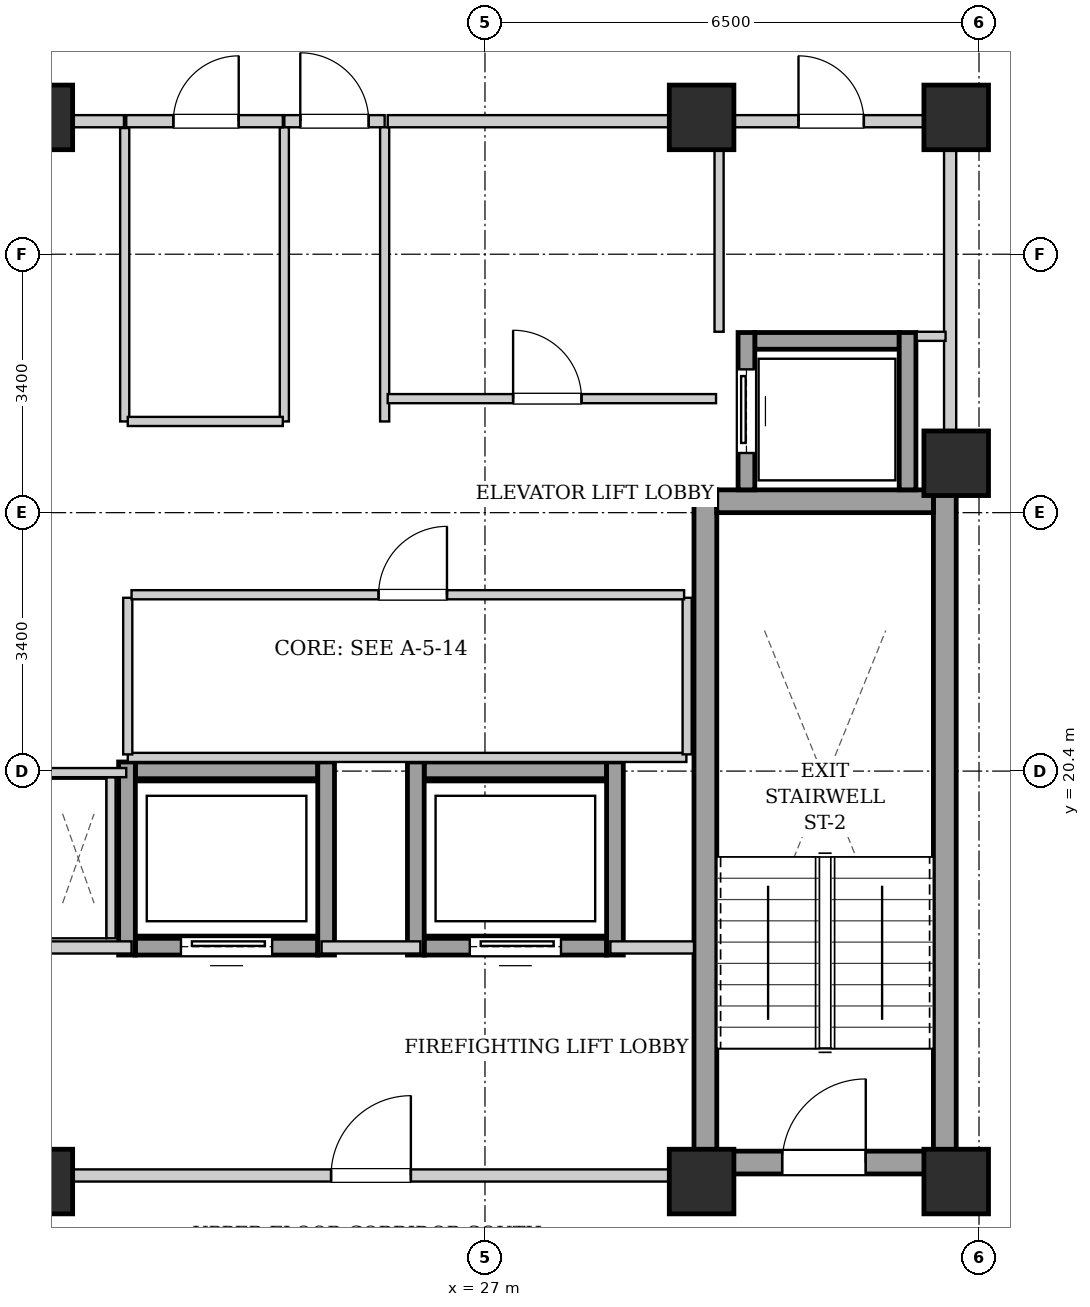
"""IFC4 building model, lengths in metres.
Left out: names, types, materials, properties, quantities, classifications, styles, units other than length and angle.
Written with IfcOpenShell. Run it as: python <this file> out.ifc"""

import sys

from ifc_helpers import new_model, si_unit, direction, frame, frame_2d, origin, origin_2d, place, context, subcontext, project, spatial, rectangle, extrude, element, fill, save


model = new_model("IFC4")
c1 = context("Model", 3, precision=1e-05, world=origin(), true_north=direction((0.0, 1.0)))
c2 = subcontext(c1, "Body", "Model", "MODEL_VIEW")
j1 = project(units=[si_unit("LENGTHUNIT", "METRE"), si_unit("PLANEANGLEUNIT", "RADIAN")], contexts=[c1])
p1 = place(None, origin())
s1 = spatial("IfcSite", under=j1, at=p1, CompositionType="ELEMENT")
p2 = place(p1, origin())
s2 = spatial("IfcBuilding", under=s1, at=p2, CompositionType="ELEMENT")
p3 = place(p2, frame((0.0, 0.0, 184.3)))
s3 = spatial("IfcBuildingStorey", under=s2, at=p3, CompositionType="ELEMENT", Elevation=184.3)
for number, where, z_axis, x_axis in (
    (1, (21.15, 15.0, 0.0), (0.0, 0.0, 1.0), (1.0, 0.0, 0.0)),
    (2, (29.85, 15.0, 0.0), (0.0, 0.0, 1.0), (1.0, 0.0, 0.0)),
    (3, (33.2, 15.0, 0.0), (0.0, 0.0, 1.0), (1.0, 0.0, 0.0)),
    (4, (21.15, 29.0, 0.0), (0.0, 0.0, 1.0), (1.0, 0.0, 0.0)),
    (5, (29.85, 29.0, 0.0), (0.0, 0.0, 1.0), (1.0, 0.0, 0.0)),
    (6, (33.2, 29.0, 0.0), (0.0, 0.0, 1.0), (1.0, 0.0, 0.0)),
    (7, (33.2, 24.45, 0.0), (0.0, 0.0, 1.0), (1.0, 0.0, 0.0)),
):
    element("IfcColumn", number, at=place(p3, frame(where, z_axis=z_axis, x_axis=x_axis)), inside=s3, PredefinedType="COLUMN", context=c2, shape_type="SweptSolid", body=[
        extrude(rectangle(XDim=0.85, YDim=0.85, at=origin_2d()), origin(), (0.0, 0.0, 1.0), 3.3),
    ])
for number, where, z_axis, x_axis in (
    (8, (29.9, 15.1, 0.0), (0.0, 0.0, 1.0), (0.0, 1.0, 0.0)),
    (9, (33.05, 15.1, 0.0), (0.0, 0.0, 1.0), (0.0, 1.0, 0.0)),
):
    element("IfcWall", number, at=place(p3, frame(where, z_axis=z_axis, x_axis=x_axis)), inside=s3, PredefinedType="SHEAR", context=c2, shape_type="SweptSolid", body=[
        extrude(rectangle(XDim=9.0, YDim=0.3, at=frame_2d((4.5, 0.0))), origin(), (0.0, 0.0, 1.0), 3.04),
    ])
p4 = place(p3, frame((30.05, 23.95, 0.0), z_axis=(0.0, 0.0, 1.0), x_axis=(1.0, 0.0, 0.0)))
e10 = element("IfcWall", 10, at=p4, inside=s3, PredefinedType="SHEAR", context=c2, shape_type="SweptSolid", body=[
    extrude(rectangle(XDim=2.85, YDim=0.3, at=frame_2d((1.425, 0.0))), origin(), (0.0, 0.0, 1.0), 3.04),
])
p5 = place(p3, frame((30.05, 15.25, 0.0), z_axis=(0.0, 0.0, 1.0), x_axis=(1.0, 0.0, 0.0)))
e11 = element("IfcWall", 11, at=p5, inside=s3, PredefinedType="SHEAR", context=c2, shape_type="SweptSolid", body=[
    extrude(rectangle(XDim=2.85, YDim=0.3, at=frame_2d((1.425, 0.0))), origin(), (0.0, 0.0, 1.0), 3.04),
])
p6 = place(p5, frame((0.86, 0.0, 0.0)))
e12 = element("IfcOpeningElement", 12, at=p6, cuts=e11, PredefinedType="OPENING", context=c2, shape_type="SweptSolid", body=[
    extrude(rectangle(XDim=1.1, YDim=2.05, at=frame_2d((0.55, 1.025))), frame((0.0, 0.16, 0.0), z_axis=(0.0, -1.0, 0.0), x_axis=(1.0, 0.0, 0.0)), (0.0, 0.0, 1.0), 0.32),
])
p7 = place(p3, frame((30.55, 26.06, 0.0), z_axis=(0.0, 0.0, 1.0), x_axis=(1.0, 0.0, 0.0)))
e13 = element("IfcWall", 13, at=p7, inside=s3, PredefinedType="SHEAR", context=c2, shape_type="SweptSolid", body=[
    extrude(rectangle(XDim=1.9, YDim=0.22, at=frame_2d((0.95, 0.0))), origin(), (0.0, 0.0, 1.0), 3.04),
])
p8 = place(p3, frame((30.44, 24.1, 0.0), z_axis=(0.0, 0.0, 1.0), x_axis=(0.0, 1.0, 0.0)))
e14 = element("IfcWall", 14, at=p8, inside=s3, PredefinedType="SHEAR", context=c2, shape_type="SweptSolid", body=[
    extrude(rectangle(XDim=2.07, YDim=0.22, at=frame_2d((1.035, 0.0))), origin(), (0.0, 0.0, 1.0), 3.04),
])
p9 = place(p8, frame((0.485, 0.0, 0.0)))
e15 = element("IfcOpeningElement", 15, at=p9, cuts=e14, PredefinedType="OPENING", context=c2, shape_type="SweptSolid", body=[
    extrude(rectangle(XDim=1.1, YDim=2.15, at=frame_2d((0.55, 1.075))), frame((0.0, 0.12, 0.0), z_axis=(0.0, -1.0, 0.0), x_axis=(1.0, 0.0, 0.0)), (0.0, 0.0, 1.0), 0.24),
])
p10 = place(p3, frame((32.56, 24.1, 0.0), z_axis=(0.0, 0.0, 1.0), x_axis=(0.0, 1.0, 0.0)))
e16 = element("IfcWall", 16, at=p10, inside=s3, PredefinedType="SHEAR", context=c2, shape_type="SweptSolid", body=[
    extrude(rectangle(XDim=2.07, YDim=0.22, at=frame_2d((1.035, 0.0))), origin(), (0.0, 0.0, 1.0), 3.04),
])
p11 = place(p3, frame((22.4, 18.09, 0.0), z_axis=(0.0, 0.0, 1.0), x_axis=(1.0, 0.0, 0.0)))
e17 = element("IfcWall", 17, at=p11, inside=s3, PredefinedType="SHEAR", context=c2, shape_type="SweptSolid", body=[
    extrude(rectangle(XDim=2.4, YDim=0.22, at=frame_2d((1.2, 0.0))), origin(), (0.0, 0.0, 1.0), 3.04),
])
p12 = place(p11, frame((0.6, 0.0, 0.0)))
e18 = element("IfcOpeningElement", 18, at=p12, cuts=e17, PredefinedType="OPENING", context=c2, shape_type="SweptSolid", body=[
    extrude(rectangle(XDim=1.2, YDim=2.15, at=frame_2d((0.6, 1.075))), frame((0.0, 0.12, 0.0), z_axis=(0.0, -1.0, 0.0), x_axis=(1.0, 0.0, 0.0)), (0.0, 0.0, 1.0), 0.24),
])
p13 = place(p3, frame((22.4, 20.41, 0.0), z_axis=(0.0, 0.0, 1.0), x_axis=(1.0, 0.0, 0.0)))
e19 = element("IfcWall", 19, at=p13, inside=s3, PredefinedType="SHEAR", context=c2, shape_type="SweptSolid", body=[
    extrude(rectangle(XDim=2.4, YDim=0.22, at=frame_2d((1.2, 0.0))), origin(), (0.0, 0.0, 1.0), 3.04),
])
for number, where, z_axis, x_axis in (
    (20, (22.29, 17.98, 0.0), (0.0, 0.0, 1.0), (0.0, 1.0, 0.0)),
    (21, (24.91, 17.98, 0.0), (0.0, 0.0, 1.0), (0.0, 1.0, 0.0)),
):
    element("IfcWall", number, at=place(p3, frame(where, z_axis=z_axis, x_axis=x_axis)), inside=s3, PredefinedType="SHEAR", context=c2, shape_type="SweptSolid", body=[
        extrude(rectangle(XDim=2.54, YDim=0.22, at=frame_2d((1.27, 0.0))), origin(), (0.0, 0.0, 1.0), 3.04),
    ])
p14 = place(p3, frame((26.2, 18.09, 0.0), z_axis=(0.0, 0.0, 1.0), x_axis=(1.0, 0.0, 0.0)))
e22 = element("IfcWall", 22, at=p14, inside=s3, PredefinedType="SHEAR", context=c2, shape_type="SweptSolid", body=[
    extrude(rectangle(XDim=2.4, YDim=0.22, at=frame_2d((1.2, 0.0))), origin(), (0.0, 0.0, 1.0), 3.04),
])
p15 = place(p14, frame((0.6, 0.0, 0.0)))
e23 = element("IfcOpeningElement", 23, at=p15, cuts=e22, PredefinedType="OPENING", context=c2, shape_type="SweptSolid", body=[
    extrude(rectangle(XDim=1.2, YDim=2.15, at=frame_2d((0.6, 1.075))), frame((0.0, 0.12, 0.0), z_axis=(0.0, -1.0, 0.0), x_axis=(1.0, 0.0, 0.0)), (0.0, 0.0, 1.0), 0.24),
])
p16 = place(p3, frame((26.2, 20.41, 0.0), z_axis=(0.0, 0.0, 1.0), x_axis=(1.0, 0.0, 0.0)))
e24 = element("IfcWall", 24, at=p16, inside=s3, PredefinedType="SHEAR", context=c2, shape_type="SweptSolid", body=[
    extrude(rectangle(XDim=2.4, YDim=0.22, at=frame_2d((1.2, 0.0))), origin(), (0.0, 0.0, 1.0), 3.04),
])
for number, where, z_axis, x_axis in (
    (25, (26.09, 17.98, 0.0), (0.0, 0.0, 1.0), (0.0, 1.0, 0.0)),
    (26, (28.71, 17.98, 0.0), (0.0, 0.0, 1.0), (0.0, 1.0, 0.0)),
):
    element("IfcWall", number, at=place(p3, frame(where, z_axis=z_axis, x_axis=x_axis)), inside=s3, PredefinedType="SHEAR", context=c2, shape_type="SweptSolid", body=[
        extrude(rectangle(XDim=2.54, YDim=0.22, at=frame_2d((1.27, 0.0))), origin(), (0.0, 0.0, 1.0), 3.04),
    ])
p17 = place(p3, frame((21.25, 15.08, 0.0), z_axis=(0.0, 0.0, 1.0), x_axis=(1.0, 0.0, 0.0)))
e27 = element("IfcWall", 27, at=p17, inside=s3, PredefinedType="PARTITIONING", context=c2, shape_type="SweptSolid", body=[
    extrude(rectangle(XDim=8.5, YDim=0.16, at=frame_2d((4.25, 0.0))), origin(), (0.0, 0.0, 1.0), 2.556),
])
p18 = place(p17, frame((3.725, 0.0, 0.0)))
e28 = element("IfcOpeningElement", 28, at=p18, cuts=e27, PredefinedType="OPENING", context=c2, shape_type="SweptSolid", body=[
    extrude(rectangle(XDim=1.05, YDim=2.05, at=frame_2d((0.525, 1.025))), frame((0.0, 0.09, 0.0), z_axis=(0.0, -1.0, 0.0), x_axis=(1.0, 0.0, 0.0)), (0.0, 0.0, 1.0), 0.18),
])
p19 = place(p3, frame((21.25, 18.08, 0.0), z_axis=(0.0, 0.0, 1.0), x_axis=(1.0, 0.0, 0.0)))
e29 = element("IfcWall", 29, at=p19, inside=s3, PredefinedType="PARTITIONING", context=c2, shape_type="SweptSolid", body=[
    extrude(rectangle(XDim=1.1, YDim=0.16, at=frame_2d((0.55, 0.0))), origin(), (0.0, 0.0, 1.0), 3.04),
])
p20 = place(p3, frame((24.85, 18.08, 0.0), z_axis=(0.0, 0.0, 1.0), x_axis=(1.0, 0.0, 0.0)))
e30 = element("IfcWall", 30, at=p20, inside=s3, PredefinedType="PARTITIONING", context=c2, shape_type="SweptSolid", body=[
    extrude(rectangle(XDim=1.3, YDim=0.16, at=frame_2d((0.65, 0.0))), origin(), (0.0, 0.0, 1.0), 3.04),
])
p21 = place(p3, frame((28.65, 18.08, 0.0), z_axis=(0.0, 0.0, 1.0), x_axis=(1.0, 0.0, 0.0)))
e31 = element("IfcWall", 31, at=p21, inside=s3, PredefinedType="PARTITIONING", context=c2, shape_type="SweptSolid", body=[
    extrude(rectangle(XDim=1.1, YDim=0.16, at=frame_2d((0.55, 0.0))), origin(), (0.0, 0.0, 1.0), 3.04),
])
p22 = place(p3, frame((33.12, 24.12, 0.0), z_axis=(0.0, 0.0, 1.0), x_axis=(0.0, 1.0, 0.0)))
e32 = element("IfcWall", 32, at=p22, inside=s3, PredefinedType="PARTITIONING", context=c2, shape_type="SweptSolid", body=[
    extrude(rectangle(XDim=4.76, YDim=0.16, at=frame_2d((2.38, 0.0))), origin(), (0.0, 0.0, 1.0), 3.04),
])
p23 = place(p3, frame((24.36, 28.95, 0.0), z_axis=(0.0, 0.0, 1.0), x_axis=(1.0, 0.0, 0.0)))
e33 = element("IfcWall", 33, at=p23, inside=s3, PredefinedType="PARTITIONING", context=c2, shape_type="SweptSolid", body=[
    extrude(rectangle(XDim=1.32, YDim=0.16, at=frame_2d((0.66, 0.0))), origin(), (0.0, 0.0, 1.0), 2.556),
])
p24 = place(p23, frame((0.21, 0.0, 0.0)))
e34 = element("IfcOpeningElement", 34, at=p24, cuts=e33, PredefinedType="OPENING", context=c2, shape_type="SweptSolid", body=[
    extrude(rectangle(XDim=0.9, YDim=2.05, at=frame_2d((0.45, 1.025))), frame((0.0, 0.09, 0.0), z_axis=(0.0, -1.0, 0.0), x_axis=(1.0, 0.0, 0.0)), (0.0, 0.0, 1.0), 0.18),
])
p25 = place(p3, frame((17.96, 28.95, 0.0), z_axis=(0.0, 0.0, 1.0), x_axis=(1.0, 0.0, 0.0)))
e35 = element("IfcWall", 35, at=p25, inside=s3, PredefinedType="PARTITIONING", context=c2, shape_type="SweptSolid", body=[
    extrude(rectangle(XDim=4.29, YDim=0.16, at=frame_2d((2.145, 0.0))), origin(), (0.0, 0.0, 1.0), 2.556),
])
p26 = place(p25, frame((1.715, 0.0, 0.0)))
e36 = element("IfcOpeningElement", 36, at=p26, cuts=e35, PredefinedType="OPENING", context=c2, shape_type="SweptSolid", body=[
    extrude(rectangle(XDim=0.86, YDim=2.05, at=frame_2d((0.43, 1.025))), frame((0.0, 0.09, 0.0), z_axis=(0.0, -1.0, 0.0), x_axis=(1.0, 0.0, 0.0)), (0.0, 0.0, 1.0), 0.18),
])
p27 = place(p3, frame((22.08, 18.2, 0.0), z_axis=(0.0, 0.0, 1.0), x_axis=(0.0, 1.0, 0.0)))
e37 = element("IfcWall", 37, at=p27, inside=s3, PredefinedType="PARTITIONING", context=c2, shape_type="SweptSolid", body=[
    extrude(rectangle(XDim=2.12, YDim=0.12, at=frame_2d((1.06, 0.0))), origin(), (0.0, 0.0, 1.0), 3.04),
])
p28 = place(p3, frame((22.28, 20.38, 0.0), z_axis=(0.0, 0.0, 1.0), x_axis=(-1.0, 0.0, 0.0)))
e38 = element("IfcWall", 38, at=p28, inside=s3, PredefinedType="PARTITIONING", context=c2, shape_type="SweptSolid", body=[
    extrude(rectangle(XDim=1.02, YDim=0.12, at=frame_2d((0.51, 0.0))), origin(), (0.0, 0.0, 1.0), 3.04),
])
for number, where, z_axis, x_axis in (
    (39, (24.36, 25.0, 0.0), (0.0, 0.0, 1.0), (0.0, 1.0, 0.0)),
    (40, (25.68, 25.0, 0.0), (0.0, 0.0, 1.0), (0.0, 1.0, 0.0)),
):
    element("IfcWall", number, at=place(p3, frame(where, z_axis=z_axis, x_axis=x_axis)), inside=s3, PredefinedType="PARTITIONING", context=c2, shape_type="SweptSolid", body=[
        extrude(rectangle(XDim=3.87, YDim=0.12, at=frame_2d((1.935, 0.0))), origin(), (0.0, 0.0, 1.0), 3.04),
    ])
p29 = place(p3, frame((30.08, 26.18, 0.0), z_axis=(0.0, 0.0, 1.0), x_axis=(0.0, 1.0, 0.0)))
e41 = element("IfcWall", 41, at=p29, inside=s3, PredefinedType="PARTITIONING", context=c2, shape_type="SweptSolid", body=[
    extrude(rectangle(XDim=2.68, YDim=0.12, at=frame_2d((1.34, 0.0))), origin(), (0.0, 0.0, 1.0), 3.04),
])
p30 = place(p3, frame((32.68, 26.12, 0.0), z_axis=(0.0, 0.0, 1.0), x_axis=(1.0, 0.0, 0.0)))
e42 = element("IfcWall", 42, at=p30, inside=s3, PredefinedType="PARTITIONING", context=c2, shape_type="SweptSolid", body=[
    extrude(rectangle(XDim=0.38, YDim=0.12, at=frame_2d((0.19, 0.0))), origin(), (0.0, 0.0, 1.0), 3.04),
])
p31 = place(p3, frame((30.08, 28.95, 0.0), z_axis=(0.0, 0.0, 1.0), x_axis=(1.0, 0.0, 0.0)))
e43 = element("IfcWall", 43, at=p31, inside=s3, PredefinedType="PARTITIONING", context=c2, shape_type="SweptSolid", body=[
    extrude(rectangle(XDim=2.96, YDim=0.16, at=frame_2d((1.48, 0.0))), origin(), (0.0, 0.0, 1.0), 3.04),
])
p32 = place(p31, frame((1.045, 0.0, 0.0)))
e44 = element("IfcOpeningElement", 44, at=p32, cuts=e43, PredefinedType="OPENING", context=c2, shape_type="SweptSolid", body=[
    extrude(rectangle(XDim=0.86, YDim=2.05, at=frame_2d((0.43, 1.025))), frame((0.0, 0.09, 0.0), z_axis=(0.0, -1.0, 0.0), x_axis=(1.0, 0.0, 0.0)), (0.0, 0.0, 1.0), 0.18),
])
p33 = place(p3, frame((22.26, 25.0, 0.0), z_axis=(0.0, 0.0, 1.0), x_axis=(0.0, 1.0, 0.0)))
e45 = element("IfcWall", 45, at=p33, inside=s3, PredefinedType="PARTITIONING", context=c2, shape_type="SweptSolid", body=[
    extrude(rectangle(XDim=3.86, YDim=0.12, at=frame_2d((1.93, 0.0))), origin(), (0.0, 0.0, 1.0), 3.04),
])
p34 = place(p3, frame((22.3, 25.0, 0.0), z_axis=(0.0, 0.0, 1.0), x_axis=(1.0, 0.0, 0.0)))
e46 = element("IfcWall", 46, at=p34, inside=s3, PredefinedType="PARTITIONING", context=c2, shape_type="SweptSolid", body=[
    extrude(rectangle(XDim=2.04, YDim=0.12, at=frame_2d((1.02, 0.0))), origin(), (0.0, 0.0, 1.0), 3.04),
])
p35 = place(p3, frame((22.28, 28.95, 0.0), z_axis=(0.0, 0.0, 1.0), x_axis=(1.0, 0.0, 0.0)))
e47 = element("IfcWall", 47, at=p35, inside=s3, PredefinedType="PARTITIONING", context=c2, shape_type="SweptSolid", body=[
    extrude(rectangle(XDim=2.06, YDim=0.16, at=frame_2d((1.03, 0.0))), origin(), (0.0, 0.0, 1.0), 2.556),
])
p36 = place(p35, frame((0.62, 0.0, 0.0)))
e48 = element("IfcOpeningElement", 48, at=p36, cuts=e47, PredefinedType="OPENING", context=c2, shape_type="SweptSolid", body=[
    extrude(rectangle(XDim=0.86, YDim=2.05, at=frame_2d((0.43, 1.025))), frame((0.0, 0.09, 0.0), z_axis=(0.0, -1.0, 0.0), x_axis=(1.0, 0.0, 0.0)), (0.0, 0.0, 1.0), 0.18),
])
p37 = place(p3, frame((25.72, 28.95, 0.0), z_axis=(0.0, 0.0, 1.0), x_axis=(1.0, 0.0, 0.0)))
e49 = element("IfcWall", 49, at=p37, inside=s3, PredefinedType="PARTITIONING", context=c2, shape_type="SweptSolid", body=[
    extrude(rectangle(XDim=4.32, YDim=0.16, at=frame_2d((2.16, 0.0))), origin(), (0.0, 0.0, 1.0), 2.556),
])
p38 = place(p3, frame((25.72, 25.3, 0.0), z_axis=(0.0, 0.0, 1.0), x_axis=(1.0, 0.0, 0.0)))
e50 = element("IfcWall", 50, at=p38, inside=s3, PredefinedType="PARTITIONING", context=c2, shape_type="SweptSolid", body=[
    extrude(rectangle(XDim=4.32, YDim=0.12, at=frame_2d((2.16, 0.0))), origin(), (0.0, 0.0, 1.0), 3.04),
])
p39 = place(p38, frame((1.65, 0.0, 0.0)))
e51 = element("IfcOpeningElement", 51, at=p39, cuts=e50, PredefinedType="OPENING", context=c2, shape_type="SweptSolid", body=[
    extrude(rectangle(XDim=0.9, YDim=2.05, at=frame_2d((0.45, 1.025))), frame((0.0, 0.07, 0.0), z_axis=(0.0, -1.0, 0.0), x_axis=(1.0, 0.0, 0.0)), (0.0, 0.0, 1.0), 0.14),
])
p40 = place(p3, frame((22.3, 20.58, 0.0), z_axis=(0.0, 0.0, 1.0), x_axis=(1.0, 0.0, 0.0)))
e52 = element("IfcWall", 52, at=p40, inside=s3, PredefinedType="PARTITIONING", context=c2, shape_type="SweptSolid", body=[
    extrude(rectangle(XDim=7.35, YDim=0.12, at=frame_2d((3.675, 0.0))), origin(), (0.0, 0.0, 1.0), 3.04),
])
for number, where, z_axis, x_axis in (
    (53, (22.3, 20.62, 0.0), (0.0, 0.0, 1.0), (0.0, 1.0, 0.0)),
    (54, (29.66, 20.62, 0.0), (0.0, 0.0, 1.0), (0.0, 1.0, 0.0)),
):
    element("IfcWall", number, at=place(p3, frame(where, z_axis=z_axis, x_axis=x_axis)), inside=s3, PredefinedType="PARTITIONING", context=c2, shape_type="SweptSolid", body=[
        extrude(rectangle(XDim=2.06, YDim=0.12, at=frame_2d((1.03, 0.0))), origin(), (0.0, 0.0, 1.0), 3.04),
    ])
p41 = place(p3, frame((22.35, 22.72, 0.0), z_axis=(0.0, 0.0, 1.0), x_axis=(1.0, 0.0, 0.0)))
e55 = element("IfcWall", 55, at=p41, inside=s3, PredefinedType="PARTITIONING", context=c2, shape_type="SweptSolid", body=[
    extrude(rectangle(XDim=7.27, YDim=0.12, at=frame_2d((3.635, 0.0))), origin(), (0.0, 0.0, 1.0), 3.04),
])
p42 = place(p41, frame((3.25, 0.0, 0.0)))
e56 = element("IfcOpeningElement", 56, at=p42, cuts=e55, PredefinedType="OPENING", context=c2, shape_type="SweptSolid", body=[
    extrude(rectangle(XDim=0.9, YDim=2.05, at=frame_2d((0.45, 1.025))), frame((0.0, 0.07, 0.0), z_axis=(0.0, -1.0, 0.0), x_axis=(1.0, 0.0, 0.0)), (0.0, 0.0, 1.0), 0.14),
])
p43 = place(p6, origin())
e57 = element("IfcDoor", 57, at=p43, inside=s3, OperationType="SINGLE_SWING_RIGHT", PredefinedType="DOOR", context=c2, shape_type="SweptSolid", body=[
    extrude(rectangle(XDim=1.1, YDim=2.05, at=frame_2d((0.55, 1.025))), frame((0.0, 0.025, 0.0), z_axis=(0.0, -1.0, 0.0), x_axis=(1.0, 0.0, 0.0)), (0.0, 0.0, 1.0), 0.05),
])
fill(e12, e57)
p44 = place(p9, origin())
e58 = element("IfcDoor", 58, at=p44, inside=s3, OperationType="SLIDING_TO_LEFT", PredefinedType="DOOR", context=c2, shape_type="SweptSolid", body=[
    extrude(rectangle(XDim=1.1, YDim=2.15, at=frame_2d((0.55, 1.075))), frame((0.0, 0.025, 0.0), z_axis=(0.0, -1.0, 0.0), x_axis=(1.0, 0.0, 0.0)), (0.0, 0.0, 1.0), 0.05),
])
fill(e15, e58)
p45 = place(p12, origin())
e59 = element("IfcDoor", 59, at=p45, inside=s3, OperationType="SLIDING_TO_LEFT", PredefinedType="DOOR", context=c2, shape_type="SweptSolid", body=[
    extrude(rectangle(XDim=1.2, YDim=2.15, at=frame_2d((0.6, 1.075))), frame((0.0, 0.025, 0.0), z_axis=(0.0, -1.0, 0.0), x_axis=(1.0, 0.0, 0.0)), (0.0, 0.0, 1.0), 0.05),
])
fill(e18, e59)
p46 = place(p15, origin())
e60 = element("IfcDoor", 60, at=p46, inside=s3, OperationType="SLIDING_TO_LEFT", PredefinedType="DOOR", context=c2, shape_type="SweptSolid", body=[
    extrude(rectangle(XDim=1.2, YDim=2.15, at=frame_2d((0.6, 1.075))), frame((0.0, 0.025, 0.0), z_axis=(0.0, -1.0, 0.0), x_axis=(1.0, 0.0, 0.0)), (0.0, 0.0, 1.0), 0.05),
])
fill(e23, e60)
p47 = place(p18, origin())
e61 = element("IfcDoor", 61, at=p47, inside=s3, OperationType="SINGLE_SWING_RIGHT", PredefinedType="DOOR", context=c2, shape_type="SweptSolid", body=[
    extrude(rectangle(XDim=1.05, YDim=2.05, at=frame_2d((0.525, 1.025))), frame((0.0, 0.025, 0.0), z_axis=(0.0, -1.0, 0.0), x_axis=(1.0, 0.0, 0.0)), (0.0, 0.0, 1.0), 0.05),
])
fill(e28, e61)
p48 = place(p24, origin())
e62 = element("IfcDoor", 62, at=p48, inside=s3, OperationType="SINGLE_SWING_LEFT", PredefinedType="DOOR", context=c2, shape_type="SweptSolid", body=[
    extrude(rectangle(XDim=0.9, YDim=2.05, at=frame_2d((0.45, 1.025))), frame((0.0, 0.025, 0.0), z_axis=(0.0, -1.0, 0.0), x_axis=(1.0, 0.0, 0.0)), (0.0, 0.0, 1.0), 0.05),
])
fill(e34, e62)
p49 = place(p32, origin())
e63 = element("IfcDoor", 63, at=p49, inside=s3, OperationType="SINGLE_SWING_LEFT", PredefinedType="DOOR", context=c2, shape_type="SweptSolid", body=[
    extrude(rectangle(XDim=0.86, YDim=2.05, at=frame_2d((0.43, 1.025))), frame((0.0, 0.025, 0.0), z_axis=(0.0, -1.0, 0.0), x_axis=(1.0, 0.0, 0.0)), (0.0, 0.0, 1.0), 0.05),
])
fill(e44, e63)
p50 = place(p36, origin())
e64 = element("IfcDoor", 64, at=p50, inside=s3, OperationType="SINGLE_SWING_RIGHT", PredefinedType="DOOR", context=c2, shape_type="SweptSolid", body=[
    extrude(rectangle(XDim=0.86, YDim=2.05, at=frame_2d((0.43, 1.025))), frame((0.0, 0.025, 0.0), z_axis=(0.0, -1.0, 0.0), x_axis=(1.0, 0.0, 0.0)), (0.0, 0.0, 1.0), 0.05),
])
fill(e48, e64)
p51 = place(p39, origin())
e65 = element("IfcDoor", 65, at=p51, inside=s3, OperationType="SINGLE_SWING_LEFT", PredefinedType="DOOR", context=c2, shape_type="SweptSolid", body=[
    extrude(rectangle(XDim=0.9, YDim=2.05, at=frame_2d((0.45, 1.025))), frame((0.0, 0.025, 0.0), z_axis=(0.0, -1.0, 0.0), x_axis=(1.0, 0.0, 0.0)), (0.0, 0.0, 1.0), 0.05),
])
fill(e51, e65)
p52 = place(p42, origin())
e66 = element("IfcDoor", 66, at=p52, inside=s3, OperationType="SINGLE_SWING_RIGHT", PredefinedType="DOOR", context=c2, shape_type="SweptSolid", body=[
    extrude(rectangle(XDim=0.9, YDim=2.05, at=frame_2d((0.45, 1.025))), frame((0.0, 0.025, 0.0), z_axis=(0.0, -1.0, 0.0), x_axis=(1.0, 0.0, 0.0)), (0.0, 0.0, 1.0), 0.05),
])
fill(e56, e66)
save(model, sys.argv[1])
